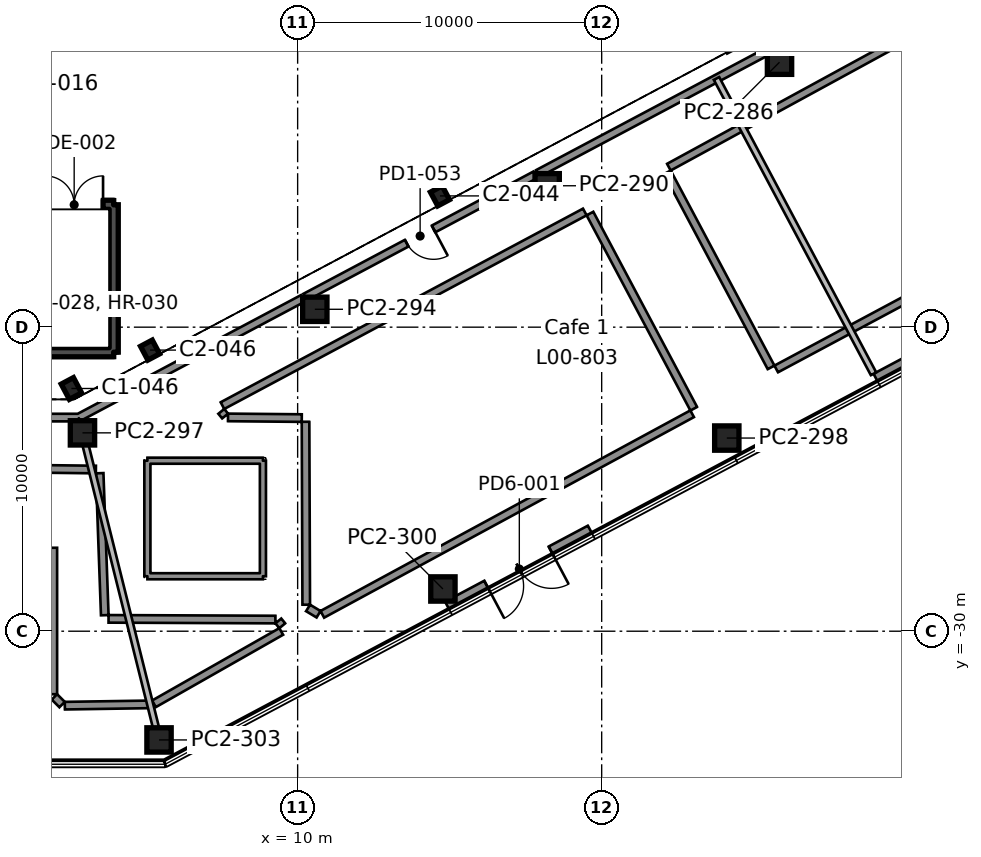
"""IFC4 building model, lengths in metres.
Left out: names, types, materials, properties, quantities, classifications, styles, units other than length and angle.
Written with IfcOpenShell. Run it as: python <this file> out.ifc"""

import sys

from ifc_helpers import new_model, si_unit, direction, frame, frame_2d, origin, origin_2d, place, context, subcontext, project, spatial, rectangle, i_section, extrude, element, fill, save


model = new_model("IFC4")
c1 = context("Model", 3, precision=1e-05, world=origin(), true_north=direction((0.0, 1.0)))
c2 = subcontext(c1, "Body", "Model", "MODEL_VIEW")
j1 = project(units=[si_unit("LENGTHUNIT", "METRE"), si_unit("PLANEANGLEUNIT", "RADIAN")], contexts=[c1])
p1 = place(None, origin())
s1 = spatial("IfcSite", under=j1, at=p1, CompositionType="ELEMENT")
p2 = place(p1, origin())
s2 = spatial("IfcBuilding", under=s1, at=p2, CompositionType="ELEMENT")
p3 = place(p2, origin())
s3 = spatial("IfcBuildingStorey", under=s2, at=p3, CompositionType="ELEMENT", Elevation=0.0)
p4 = place(p3, frame((2.559, -22.017, 0.0), z_axis=(0.0, 0.0, 1.0), x_axis=(0.882947592859, 0.469471562786, 0.0)))
e1 = element("IfcColumn", 1, at=p4, inside=s3, PredefinedType="COLUMN", context=c2, shape_type="SweptSolid", body=[
    extrude(i_section(OverallWidth=0.455, OverallDepth=0.569, WebThickness=0.078, FlangeThickness=0.125, FilletRadius=0.015, at=origin_2d()), origin(), (0.0, 0.0, 1.0), 7.0),
])
for number, where, z_axis, x_axis in (
    (2, (5.146, -20.754, 0.0), (0.0, 0.0, 1.0), (0.883, 0.469, 0.0)),
    (3, (14.681, -15.683, 0.0), (0.0, 0.0, 1.0), (0.883, 0.469, 0.0)),
):
    element("IfcColumn", number, at=place(p3, frame(where, z_axis=z_axis, x_axis=x_axis)), inside=s3, PredefinedType="COLUMN", context=c2, shape_type="SweptSolid", body=[
        extrude(i_section(OverallWidth=0.437, OverallDepth=0.513, WebThickness=0.061, FlangeThickness=0.097, FilletRadius=0.015, at=origin_2d()), origin(), (0.0, 0.0, 1.0), 7.0),
    ])
p5 = place(p3, frame((3.95, -15.975, 0.0), z_axis=(0.0, 0.0, 1.0), x_axis=(0.0, -1.0, 0.0)))
e4 = element("IfcWall", 4, at=p5, inside=s3, PredefinedType="SHEAR", context=c2, shape_type="SweptSolid", body=[
    extrude(rectangle(XDim=4.85, YDim=0.3, at=frame_2d((2.425, 0.0))), origin(), (0.0, 0.0, 1.0), 7.0),
])
p6 = place(p3, frame((3.95, -20.825, 0.0), z_axis=(0.0, 0.0, 1.0), x_axis=(-1.0, 0.0, 0.0)))
e5 = element("IfcWall", 5, at=p6, inside=s3, PredefinedType="SHEAR", context=c2, shape_type="SweptSolid", body=[
    extrude(rectangle(XDim=8.3, YDim=0.3, at=frame_2d((4.15, 0.0))), origin(), (0.0, 0.0, 1.0), 7.0),
])
p7 = place(p3, frame((-4.35, -15.975, 0.0), z_axis=(0.0, 0.0, 1.0), x_axis=(1.0, 0.0, 0.0)))
e6 = element("IfcWall", 6, at=p7, inside=s3, PredefinedType="SHEAR", context=c2, shape_type="SweptSolid", body=[
    extrude(rectangle(XDim=8.3, YDim=0.3, at=frame_2d((4.15, 0.0))), origin(), (0.0, 0.0, 1.0), 7.0),
])
p8 = place(p7, frame((6.05, 0.0, 0.0)))
e7 = element("IfcOpeningElement", 7, at=p8, cuts=e6, PredefinedType="OPENING", context=c2, shape_type="SweptSolid", body=[
    extrude(rectangle(XDim=1.9, YDim=2.1, at=frame_2d((0.95, 1.05))), frame((0.0, 0.16, 0.0), z_axis=(0.0, -1.0, 0.0), x_axis=(1.0, 0.0, 0.0)), (0.0, 0.0, 1.0), 0.32),
])
for number, where, z_axis, x_axis in (
    (8, (5.441, -33.576, 0.0), (0.0, 0.0, 1.0), (1.0, 0.0, 0.0)),
    (9, (14.778, -28.611, 0.0), (0.0, 0.0, 1.0), (1.0, 0.0, 0.0)),
    (10, (24.115, -23.647, 0.0), (0.0, 0.0, 1.0), (1.0, 0.0, 0.0)),
    (11, (2.923, -23.476, 0.0), (0.0, 0.0, 1.0), (1.0, 0.0, 0.0)),
    (12, (10.565, -19.412, 0.0), (0.0, 0.0, 1.0), (1.0, 0.0, 0.0)),
    (13, (18.207, -15.349, 0.0), (0.0, 0.0, 1.0), (1.0, 0.0, 0.0)),
    (14, (25.849, -11.286, 0.0), (0.0, 0.0, 1.0), (1.0, 0.0, 0.0)),
):
    element("IfcColumn", number, at=place(p3, frame(where, z_axis=z_axis, x_axis=x_axis)), inside=s3, PredefinedType="COLUMN", context=c2, shape_type="SweptSolid", body=[
        extrude(rectangle(XDim=0.8, YDim=0.8, at=origin_2d()), origin(), (0.0, 0.0, 1.0), 6.37),
    ])
p9 = place(p3, frame((14.942, -29.203, 0.0), z_axis=(0.0, 0.0, 1.0), x_axis=(0.882950500829, 0.469466093648, 0.0)))
e15 = element("IfcWall", 15, at=p9, inside=s3, PredefinedType="SOLIDWALL", context=c2, shape_type="SweptSolid", body=[
    extrude(rectangle(XDim=5.321, YDim=0.4, at=frame_2d((2.66, 0.0))), origin(), (0.0, 0.0, 1.0), 6.37),
])
p10 = place(p9, frame((1.46, 0.0, 0.0)))
e16 = element("IfcOpeningElement", 16, at=p10, cuts=e15, PredefinedType="OPENING", context=c2, shape_type="SweptSolid", body=[
    extrude(rectangle(XDim=2.4, YDim=2.4, at=frame_2d((1.2, 1.2))), frame((0.0, 0.21, 0.0), z_axis=(0.0, -1.0, 0.0), x_axis=(1.0, 0.0, 0.0)), (0.0, 0.0, 1.0), 0.42),
])
p11 = place(p3, frame((29.035, -21.71, 0.0), z_axis=(0.0, 0.0, 1.0), x_axis=(0.882950500829, 0.469466093648, 0.0)))
e17 = element("IfcWall", 17, at=p11, inside=s3, PredefinedType="SOLIDWALL", context=c2, shape_type="SweptSolid", body=[
    extrude(rectangle(XDim=26.603, YDim=0.4, at=frame_2d((13.301, 0.0))), origin(), (0.0, 0.0, 1.0), 6.37),
])
p12 = place(p11, frame((1.46, 0.0, 0.0)))
e18 = element("IfcOpeningElement", 18, at=p12, cuts=e17, PredefinedType="OPENING", context=c2, shape_type="SweptSolid", body=[
    extrude(rectangle(XDim=2.4, YDim=2.4, at=frame_2d((1.2, 1.2))), frame((0.0, 0.21, 0.0), z_axis=(0.0, -1.0, 0.0), x_axis=(1.0, 0.0, 0.0)), (0.0, 0.0, 1.0), 0.42),
])
p13 = place(p3, frame((-3.295, -24.604, 7.0), z_axis=(0.0, 0.0, 1.0), x_axis=(0.999929472712, -0.011876430557, 0.0)))
e19 = element("IfcWall", 19, at=p13, inside=s3, PredefinedType="STANDARD", context=c2, shape_type="SweptSolid", body=[
    extrude(rectangle(XDim=6.66, YDim=0.25, at=frame_2d((3.33, 0.0))), origin(), (0.0, 0.0, 1.0), 0.65),
])
p14 = place(p3, frame((3.488, -24.803, 7.0), z_axis=(0.0, 0.0, 1.0), x_axis=(0.036099618573, -0.999348196345, 0.0)))
e20 = element("IfcWall", 20, at=p14, inside=s3, PredefinedType="STANDARD", context=c2, shape_type="SweptSolid", body=[
    extrude(rectangle(XDim=4.673, YDim=0.25, at=frame_2d((2.336, 0.0))), origin(), (0.0, 0.0, 1.0), 0.65),
])
p15 = place(p3, frame((3.781, -29.594, 7.0), z_axis=(0.0, 0.0, 1.0), x_axis=(0.99999144192, -0.004137159309, 0.0)))
e21 = element("IfcWall", 21, at=p15, inside=s3, PredefinedType="STANDARD", context=c2, shape_type="SweptSolid", body=[
    extrude(rectangle(XDim=5.488, YDim=0.25, at=frame_2d((2.744, 0.0))), origin(), (0.0, 0.0, 1.0), 0.65),
])
p16 = place(p3, frame((9.365, -29.662, 7.0), z_axis=(0.0, 0.0, 1.0), x_axis=(0.633822610937, -0.773478440466, 0.0)))
e22 = element("IfcWall", 22, at=p16, inside=s3, PredefinedType="STANDARD", context=c2, shape_type="SweptSolid", body=[
    extrude(rectangle(XDim=0.205, YDim=0.25, at=frame_2d((0.102, 0.0))), origin(), (0.0, 0.0, 1.0), 0.65),
])
p17 = place(p3, frame((9.46, -30.009, 7.0), z_axis=(0.0, 0.0, 1.0), x_axis=(-0.86931446801, -0.494259401234, 0.0)))
e23 = element("IfcWall", 23, at=p17, inside=s3, PredefinedType="STANDARD", context=c2, shape_type="SweptSolid", body=[
    extrude(rectangle(XDim=4.815, YDim=0.25, at=frame_2d((2.407, 0.0))), origin(), (0.0, 0.0, 1.0), 0.65),
])
p18 = place(p3, frame((5.214, -32.405, 7.0), z_axis=(0.0, 0.0, 1.0), x_axis=(-0.999881577191, -0.015389333799, 0.0)))
e24 = element("IfcWall", 24, at=p18, inside=s3, PredefinedType="STANDARD", context=c2, shape_type="SweptSolid", body=[
    extrude(rectangle(XDim=2.871, YDim=0.25, at=frame_2d((1.436, 0.0))), origin(), (0.0, 0.0, 1.0), 0.65),
])
p19 = place(p3, frame((2.253, -32.412, 7.0), z_axis=(0.0, 0.0, 1.0), x_axis=(-0.707449122826, 0.706764273724, 0.0)))
e25 = element("IfcWall", 25, at=p19, inside=s3, PredefinedType="STANDARD", context=c2, shape_type="SweptSolid", body=[
    extrude(rectangle(XDim=0.356, YDim=0.25, at=frame_2d((0.178, 0.0))), origin(), (0.0, 0.0, 1.0), 0.65),
])
p20 = place(p3, frame((1.964, -32.072, 7.0), z_axis=(0.0, 0.0, 1.0), x_axis=(0.0, 1.0, 0.0)))
e26 = element("IfcWall", 26, at=p20, inside=s3, PredefinedType="STANDARD", context=c2, shape_type="SweptSolid", body=[
    extrude(rectangle(XDim=4.816, YDim=0.25, at=frame_2d((2.408, 0.0))), origin(), (0.0, 0.0, 1.0), 0.65),
])
p21 = place(p3, frame((10.688, -29.442, 7.0), z_axis=(0.0, 0.0, 1.0), x_axis=(-0.857278567412, 0.514852850683, 0.0)))
e27 = element("IfcWall", 27, at=p21, inside=s3, PredefinedType="STANDARD", context=c2, shape_type="SweptSolid", body=[
    extrude(rectangle(XDim=0.402, YDim=0.25, at=frame_2d((0.201, 0.0))), origin(), (0.0, 0.0, 1.0), 0.65),
])
p22 = place(p3, frame((10.282, -29.128, 7.0), z_axis=(0.0, 0.0, 1.0), x_axis=(-0.003773558038, 0.999992880105, 0.0)))
e28 = element("IfcWall", 28, at=p22, inside=s3, PredefinedType="STANDARD", context=c2, shape_type="SweptSolid", body=[
    extrude(rectangle(XDim=6.017, YDim=0.25, at=frame_2d((3.008, 0.0))), origin(), (0.0, 0.0, 1.0), 0.65),
])
p23 = place(p3, frame((10.136, -22.99, 7.0), z_axis=(0.0, 0.0, 1.0), x_axis=(-0.999958062523, 0.009158231048, 0.0)))
e29 = element("IfcWall", 29, at=p23, inside=s3, PredefinedType="STANDARD", context=c2, shape_type="SweptSolid", body=[
    extrude(rectangle(XDim=2.426, YDim=0.25, at=frame_2d((1.213, 0.0))), origin(), (0.0, 0.0, 1.0), 0.65),
])
p24 = place(p3, frame((7.615, -22.922, 7.0), z_axis=(0.0, 0.0, 1.0), x_axis=(-0.633843143995, 0.77346161431, 0.0)))
e30 = element("IfcWall", 30, at=p24, inside=s3, PredefinedType="STANDARD", context=c2, shape_type="SweptSolid", body=[
    extrude(rectangle(XDim=0.198, YDim=0.25, at=frame_2d((0.099, 0.0))), origin(), (0.0, 0.0, 1.0), 0.65),
])
p25 = place(p3, frame((7.527, -22.58, 7.0), z_axis=(0.0, 0.0, 1.0), x_axis=(0.88197155135, 0.47130264439, 0.0)))
e31 = element("IfcWall", 31, at=p25, inside=s3, PredefinedType="STANDARD", context=c2, shape_type="SweptSolid", body=[
    extrude(rectangle(XDim=13.513, YDim=0.25, at=frame_2d((6.756, 0.0))), origin(), (0.0, 0.0, 1.0), 0.65),
])
p26 = place(p3, frame((19.614, -16.263, 7.0), z_axis=(0.0, 0.0, 1.0), x_axis=(0.469474320709, -0.88294612644, 0.0)))
e32 = element("IfcWall", 32, at=p26, inside=s3, PredefinedType="STANDARD", context=c2, shape_type="SweptSolid", body=[
    extrude(rectangle(XDim=7.271, YDim=0.25, at=frame_2d((3.636, 0.0))), origin(), (0.0, 0.0, 1.0), 0.65),
])
p27 = place(p3, frame((22.975, -22.848, 7.0), z_axis=(0.0, 0.0, 1.0), x_axis=(-0.879054789802, -0.476720753195, 0.0)))
e33 = element("IfcWall", 33, at=p27, inside=s3, PredefinedType="STANDARD", context=c2, shape_type="SweptSolid", body=[
    extrude(rectangle(XDim=13.837, YDim=0.25, at=frame_2d((6.918, 0.0))), origin(), (0.0, 0.0, 1.0), 0.65),
])
p28 = place(p3, frame((34.951, -16.446, 7.0), z_axis=(0.0, 0.0, 1.0), x_axis=(-0.881692170712, -0.471825090585, 0.0)))
e34 = element("IfcWall", 34, at=p28, inside=s3, PredefinedType="STANDARD", context=c2, shape_type="SweptSolid", body=[
    extrude(rectangle(XDim=10.446, YDim=0.25, at=frame_2d((5.223, 0.0))), origin(), (0.0, 0.0, 1.0), 0.65),
])
p29 = place(p3, frame((25.572, -21.323, 7.0), z_axis=(0.0, 0.0, 1.0), x_axis=(-0.469485947984, 0.882939943963, 0.0)))
e35 = element("IfcWall", 35, at=p29, inside=s3, PredefinedType="STANDARD", context=c2, shape_type="SweptSolid", body=[
    extrude(rectangle(XDim=7.268, YDim=0.25, at=frame_2d((3.634, 0.0))), origin(), (0.0, 0.0, 1.0), 0.65),
])
p30 = place(p3, frame((22.21, -14.738, 7.0), z_axis=(0.0, 0.0, 1.0), x_axis=(0.8778734739, 0.478892643317, 0.0)))
e36 = element("IfcWall", 36, at=p30, inside=s3, PredefinedType="STANDARD", context=c2, shape_type="SweptSolid", body=[
    extrude(rectangle(XDim=10.555, YDim=0.25, at=frame_2d((5.278, 0.0))), origin(), (0.0, 0.0, 1.0), 0.65),
])
for number, where, z_axis, x_axis in (
    (37, (8.858, -28.192, 6.92), (0.0, 0.0, 1.0), (-1.0, 0.0, 0.0)),
    (38, (5.058, -28.192, 6.92), (0.0, 0.0, 1.0), (0.0, 1.0, 0.0)),
    (39, (5.058, -24.392, 6.92), (0.0, 0.0, 1.0), (1.0, 0.0, 0.0)),
    (40, (8.858, -24.392, 6.92), (0.0, 0.0, 1.0), (0.0, -1.0, 0.0)),
):
    element("IfcWall", number, at=place(p3, frame(where, z_axis=z_axis, x_axis=x_axis)), inside=s3, PredefinedType="SOLIDWALL", context=c2, shape_type="SweptSolid", body=[
        extrude(rectangle(XDim=3.8, YDim=0.2, at=frame_2d((1.9, 0.0))), origin(), (0.0, 0.0, 1.0), 0.18),
    ])
p31 = place(p3, frame((28.942, -21.533, 0.0), z_axis=(0.0, 0.0, 1.0), x_axis=(-0.469480826486, 0.8829426672, 0.0)))
e41 = element("IfcWall", 41, at=p31, inside=s3, PredefinedType="PARTITIONING", context=c2, shape_type="SweptSolid", body=[
    extrude(rectangle(XDim=11.0, YDim=0.2, at=frame_2d((5.5, 0.0))), origin(), (0.0, 0.0, 1.0), 6.37),
])
p32 = place(p3, frame((3.023, -23.876, 0.0), z_axis=(0.0, 0.0, 1.0), x_axis=(0.241930250256, -0.970293643188, 0.0)))
e42 = element("IfcWall", 42, at=p32, inside=s3, PredefinedType="PARTITIONING", context=c2, shape_type="SweptSolid", body=[
    extrude(rectangle(XDim=9.585, YDim=0.2, at=frame_2d((4.792, 0.0))), origin(), (0.0, 0.0, 1.0), 6.37),
])
p33 = place(p3, frame((23.781, -11.819, 0.0), z_axis=(0.0, 0.0, 1.0), x_axis=(-0.882996705644, -0.469379183413, 0.0)))
e43 = element("IfcWall", 43, at=p33, inside=s3, PredefinedType="SOLIDWALL", context=c2, shape_type="SweptSolid", body=[
    extrude(rectangle(XDim=6.668, YDim=0.25, at=frame_2d((3.334, 0.0))), origin(), (0.0, 0.0, 1.0), 6.37),
])
p34 = place(p3, frame((17.807, -14.995, 0.0), z_axis=(0.0, 0.0, 1.0), x_axis=(-0.882988627018, -0.46939438062, 0.0)))
e44 = element("IfcWall", 44, at=p34, inside=s3, PredefinedType="SOLIDWALL", context=c2, shape_type="SweptSolid", body=[
    extrude(rectangle(XDim=8.558, YDim=0.25, at=frame_2d((4.279, 0.0))), origin(), (0.0, 0.0, 1.0), 6.37),
])
p35 = place(p34, frame((3.779, 0.0, 0.0)))
e45 = element("IfcOpeningElement", 45, at=p35, cuts=e44, PredefinedType="OPENING", context=c2, shape_type="SweptSolid", body=[
    extrude(rectangle(XDim=1.0, YDim=2.1, at=frame_2d((0.5, 1.05))), frame((0.0, 0.135, 0.0), z_axis=(0.0, -1.0, 0.0), x_axis=(1.0, 0.0, 0.0)), (0.0, 0.0, 1.0), 0.27),
])
p36 = place(p3, frame((10.165, -19.057, 0.0), z_axis=(0.0, 0.0, 1.0), x_axis=(-0.882987691761, -0.469396139949, 0.0)))
e46 = element("IfcWall", 46, at=p36, inside=s3, PredefinedType="SOLIDWALL", context=c2, shape_type="SweptSolid", body=[
    extrude(rectangle(XDim=8.347, YDim=0.25, at=frame_2d((4.174, 0.0))), origin(), (0.0, 0.0, 1.0), 6.37),
])
p37 = place(p3, frame((33.091, -6.869, 0.0), z_axis=(0.0, 0.0, 1.0), x_axis=(-0.882945366868, -0.469475749243, 0.0)))
e47 = element("IfcWall", 47, at=p37, inside=s3, PredefinedType="SOLIDWALL", context=c2, shape_type="SweptSolid", body=[
    extrude(rectangle(XDim=8.557, YDim=0.25, at=frame_2d((4.279, 0.0))), origin(), (0.0, 0.0, 1.0), 6.37),
])
p38 = place(p37, frame((3.779, 0.0, 0.0)))
e48 = element("IfcOpeningElement", 48, at=p38, cuts=e47, PredefinedType="OPENING", context=c2, shape_type="SweptSolid", body=[
    extrude(rectangle(XDim=1.0, YDim=2.1, at=frame_2d((0.5, 1.05))), frame((0.0, 0.135, 0.0), z_axis=(0.0, -1.0, 0.0), x_axis=(1.0, 0.0, 0.0)), (0.0, 0.0, 1.0), 0.27),
])
p39 = place(p3, frame((25.449, -10.932, 0.0), z_axis=(0.0, 0.0, 1.0), x_axis=(-0.882889505907, -0.469580792153, 0.0)))
e49 = element("IfcWall", 49, at=p39, inside=s3, PredefinedType="SOLIDWALL", context=c2, shape_type="SweptSolid", body=[
    extrude(rectangle(XDim=1.887, YDim=0.25, at=frame_2d((0.944, 0.0))), origin(), (0.0, 0.0, 1.0), 6.37),
])
p40 = place(p3, frame((2.802, -22.974, 0.0), z_axis=(0.0, 0.0, 1.0), x_axis=(-1.0, 0.0, 0.0)))
e50 = element("IfcWall", 50, at=p40, inside=s3, PredefinedType="SOLIDWALL", context=c2, shape_type="SweptSolid", body=[
    extrude(rectangle(XDim=5.604, YDim=0.25, at=frame_2d((2.802, 0.0))), origin(), (0.0, 0.0, 1.0), 6.37),
])
p41 = place(p40, frame((1.902, 0.0, 0.0)))
e51 = element("IfcOpeningElement", 51, at=p41, cuts=e50, PredefinedType="OPENING", context=c2, shape_type="SweptSolid", body=[
    extrude(rectangle(XDim=1.8, YDim=2.1, at=frame_2d((0.9, 1.05))), frame((0.0, 0.135, 0.0), z_axis=(0.0, -1.0, 0.0), x_axis=(1.0, 0.0, 0.0)), (0.0, 0.0, 1.0), 0.27),
])
p42 = place(p8, origin())
e52 = element("IfcDoor", 52, at=p42, inside=s3, OperationType="DOUBLE_DOOR_SINGLE_SWING", PredefinedType="DOOR", context=c2, shape_type="SweptSolid", body=[
    extrude(rectangle(XDim=1.9, YDim=2.1, at=frame_2d((0.95, 1.05))), frame((0.0, 0.025, 0.0), z_axis=(0.0, -1.0, 0.0), x_axis=(1.0, 0.0, 0.0)), (0.0, 0.0, 1.0), 0.05),
])
fill(e7, e52)
p43 = place(p10, frame((2.4, 0.0, 0.0), z_axis=(0.0, 0.0, 1.0), x_axis=(-1.0, 0.0, 0.0)))
e53 = element("IfcDoor", 53, at=p43, inside=s3, OperationType="DOUBLE_DOOR_SINGLE_SWING", PredefinedType="DOOR", context=c2, shape_type="SweptSolid", body=[
    extrude(rectangle(XDim=2.4, YDim=2.4, at=frame_2d((1.2, 1.2))), frame((0.0, 0.025, 0.0), z_axis=(0.0, -1.0, 0.0), x_axis=(1.0, 0.0, 0.0)), (0.0, 0.0, 1.0), 0.05),
])
fill(e16, e53)
p44 = place(p3, frame((0.0, 0.0, 6.37)))
p45 = place(p44, frame((6.958, -26.292, 0.0)))
p46 = place(p45, frame((0.0, 0.0, 0.5)))
e54 = element("IfcWindow", 54, at=p46, inside=s3, PartitioningType="SINGLE_PANEL", PredefinedType="SKYLIGHT", context=c2, shape_type="SweptSolid", body=[
    extrude(rectangle(XDim=3.6, YDim=3.6, at=origin_2d()), origin(), (0.0, 0.0, 1.0), 0.05),
])
p47 = place(p35, origin())
e55 = element("IfcDoor", 55, at=p47, inside=s3, OperationType="SINGLE_SWING_LEFT", PredefinedType="DOOR", context=c2, shape_type="SweptSolid", body=[
    extrude(rectangle(XDim=1.0, YDim=2.1, at=frame_2d((0.5, 1.05))), frame((0.0, 0.025, 0.0), z_axis=(0.0, -1.0, 0.0), x_axis=(1.0, 0.0, 0.0)), (0.0, 0.0, 1.0), 0.05),
])
fill(e45, e55)
save(model, sys.argv[1])
